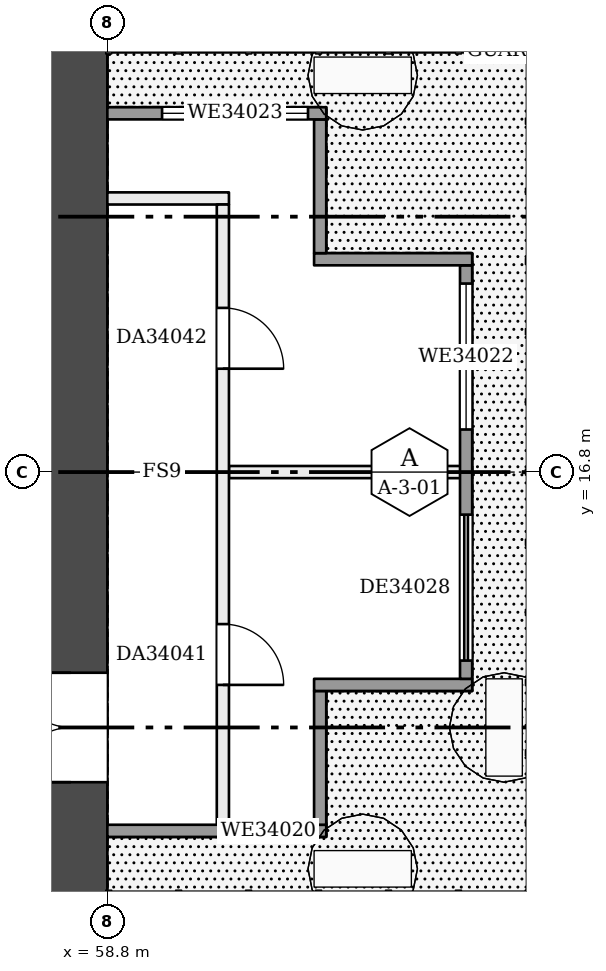
"""IFC4 building model, lengths in metres.
Left out: names, types, materials, properties, quantities, classifications, styles, units other than length and angle.
Written with IfcOpenShell. Run it as: python <this file> out.ifc"""

import sys

from ifc_helpers import new_model, si_unit, direction, frame, frame_2d, origin, place, context, subcontext, project, spatial, rectangle, extrude, element, fill, save


model = new_model("IFC4")
c1 = context("Model", 3, precision=1e-05, world=origin(), true_north=direction((0.0, 1.0)))
c2 = subcontext(c1, "Body", "Model", "MODEL_VIEW")
j1 = project(units=[si_unit("LENGTHUNIT", "METRE"), si_unit("PLANEANGLEUNIT", "RADIAN")], contexts=[c1])
p1 = place(None, origin())
s1 = spatial("IfcSite", under=j1, at=p1, CompositionType="ELEMENT")
p2 = place(p1, origin())
s2 = spatial("IfcBuilding", under=s1, at=p2, CompositionType="ELEMENT")
p3 = place(p2, frame((0.0, 0.0, 133.7)))
s3 = spatial("IfcBuildingStorey", under=s2, at=p3, CompositionType="ELEMENT", Elevation=133.7)
p4 = place(p3, frame((58.2, 9.6, 0.0), z_axis=(0.0, 0.0, 1.0), x_axis=(0.0, 1.0, 0.0)))
e1 = element("IfcWall", 1, at=p4, inside=s3, PredefinedType="SHEAR", context=c2, shape_type="SweptSolid", body=[
    extrude(rectangle(XDim=14.4, YDim=1.2, at=frame_2d((7.2, 0.0))), origin(), (0.0, 0.0, 1.0), 3.22),
])
p5 = place(p4, frame((2.1, 0.0, 0.0)))
e2 = element("IfcOpeningElement", 2, at=p5, cuts=e1, PredefinedType="OPENING", context=c2, shape_type="SweptSolid", body=[
    extrude(rectangle(XDim=1.8, YDim=2.1, at=frame_2d((0.9, 1.05))), frame((0.0, 0.61, 0.0), z_axis=(0.0, -1.0, 0.0), x_axis=(1.0, 0.0, 0.0)), (0.0, 0.0, 1.0), 1.22),
])
p6 = place(p3, frame((60.8, 16.8, 0.0), z_axis=(0.0, 0.0, 1.0), x_axis=(1.0, 0.0, 0.0)))
e3 = element("IfcWall", 3, at=p6, inside=s3, PredefinedType="PARTITIONING", context=c2, shape_type="SweptSolid", body=[
    extrude(rectangle(XDim=3.9, YDim=0.2, at=frame_2d((1.95, 0.0))), origin(), (0.0, 0.0, 1.0), 3.22),
])
p7 = place(p3, frame((58.8, 21.3, 0.0), z_axis=(0.0, 0.0, 1.0), x_axis=(1.0, 0.0, 0.0)))
e4 = element("IfcWall", 4, at=p7, inside=s3, PredefinedType="PARTITIONING", context=c2, shape_type="SweptSolid", body=[
    extrude(rectangle(XDim=2.0, YDim=0.2, at=frame_2d((1.0, 0.0))), origin(), (0.0, 0.0, 1.0), 3.22),
])
p8 = place(p3, frame((60.7, 10.9, 0.0), z_axis=(0.0, 0.0, 1.0), x_axis=(0.0, 1.0, 0.0)))
e5 = element("IfcWall", 5, at=p8, inside=s3, PredefinedType="PARTITIONING", context=c2, shape_type="SweptSolid", body=[
    extrude(rectangle(XDim=10.3, YDim=0.2, at=frame_2d((5.15, 0.0))), origin(), (0.0, 0.0, 1.0), 3.22),
])
p9 = place(p8, frame((2.4, 0.0, 0.0)))
e6 = element("IfcOpeningElement", 6, at=p9, cuts=e5, PredefinedType="OPENING", context=c2, shape_type="SweptSolid", body=[
    extrude(rectangle(XDim=1.0, YDim=2.1, at=frame_2d((0.5, 1.05))), frame((0.0, 0.11, 0.0), z_axis=(0.0, -1.0, 0.0), x_axis=(1.0, 0.0, 0.0)), (0.0, 0.0, 1.0), 0.22),
])
p10 = place(p8, frame((7.6, 0.0, 0.0)))
e7 = element("IfcOpeningElement", 7, at=p10, cuts=e5, PredefinedType="OPENING", context=c2, shape_type="SweptSolid", body=[
    extrude(rectangle(XDim=1.0, YDim=2.1, at=frame_2d((0.5, 1.05))), frame((0.0, 0.11, 0.0), z_axis=(0.0, -1.0, 0.0), x_axis=(1.0, 0.0, 0.0)), (0.0, 0.0, 1.0), 0.22),
])
p11 = place(p3, frame((58.8, 10.9, 0.0), z_axis=(0.0, 0.0, 1.0), x_axis=(1.0, 0.0, 0.0)))
e8 = element("IfcWall", 8, at=p11, inside=s3, PredefinedType="SOLIDWALL", context=c2, shape_type="SweptSolid", body=[
    extrude(rectangle(XDim=3.6, YDim=0.2, at=frame_2d((1.8, 0.0))), origin(), (0.0, 0.0, 1.0), 3.22),
])
p12 = place(p11, frame((2.0, 0.0, 0.9)))
e9 = element("IfcOpeningElement", 9, at=p12, cuts=e8, PredefinedType="OPENING", context=c2, shape_type="SweptSolid", body=[
    extrude(rectangle(XDim=1.3, YDim=1.5, at=frame_2d((0.65, 0.75))), frame((0.0, 0.11, 0.0), z_axis=(0.0, -1.0, 0.0), x_axis=(1.0, 0.0, 0.0)), (0.0, 0.0, 1.0), 0.22),
])
p13 = place(p3, frame((62.3, 11.0, 0.0), z_axis=(0.0, 0.0, 1.0), x_axis=(0.0, 1.0, 0.0)))
e10 = element("IfcWall", 10, at=p13, inside=s3, PredefinedType="SOLIDWALL", context=c2, shape_type="SweptSolid", body=[
    extrude(rectangle(XDim=2.2, YDim=0.2, at=frame_2d((1.1, 0.0))), origin(), (0.0, 0.0, 1.0), 3.22),
])
p14 = place(p3, frame((62.2, 13.3, 0.0), z_axis=(0.0, 0.0, 1.0), x_axis=(1.0, 0.0, 0.0)))
e11 = element("IfcWall", 11, at=p14, inside=s3, PredefinedType="SOLIDWALL", context=c2, shape_type="SweptSolid", body=[
    extrude(rectangle(XDim=2.6, YDim=0.2, at=frame_2d((1.3, 0.0))), origin(), (0.0, 0.0, 1.0), 3.22),
])
p15 = place(p3, frame((64.7, 13.4, 0.0), z_axis=(0.0, 0.0, 1.0), x_axis=(0.0, 1.0, 0.0)))
e12 = element("IfcWall", 12, at=p15, inside=s3, PredefinedType="SOLIDWALL", context=c2, shape_type="SweptSolid", body=[
    extrude(rectangle(XDim=6.8, YDim=0.2, at=frame_2d((3.4, 0.0))), origin(), (0.0, 0.0, 1.0), 3.22),
])
p16 = place(p15, frame((4.1, 0.0, 0.9)))
e13 = element("IfcOpeningElement", 13, at=p16, cuts=e12, PredefinedType="OPENING", context=c2, shape_type="SweptSolid", body=[
    extrude(rectangle(XDim=2.4, YDim=1.5, at=frame_2d((1.2, 0.75))), frame((0.0, 0.11, 0.0), z_axis=(0.0, -1.0, 0.0), x_axis=(1.0, 0.0, 0.0)), (0.0, 0.0, 1.0), 0.22),
])
p17 = place(p15, frame((0.3, 0.0, 0.0)))
e14 = element("IfcOpeningElement", 14, at=p17, cuts=e12, PredefinedType="OPENING", context=c2, shape_type="SweptSolid", body=[
    extrude(rectangle(XDim=2.4, YDim=2.2, at=frame_2d((1.2, 1.1))), frame((0.0, 0.11, 0.0), z_axis=(0.0, -1.0, 0.0), x_axis=(1.0, 0.0, 0.0)), (0.0, 0.0, 1.0), 0.22),
])
p18 = place(p3, frame((64.8, 20.3, 0.0), z_axis=(0.0, 0.0, 1.0), x_axis=(-1.0, 0.0, 0.0)))
e15 = element("IfcWall", 15, at=p18, inside=s3, PredefinedType="SOLIDWALL", context=c2, shape_type="SweptSolid", body=[
    extrude(rectangle(XDim=2.6, YDim=0.2, at=frame_2d((1.3, 0.0))), origin(), (0.0, 0.0, 1.0), 3.22),
])
p19 = place(p3, frame((62.3, 20.4, 0.0), z_axis=(0.0, 0.0, 1.0), x_axis=(0.0, 1.0, 0.0)))
e16 = element("IfcWall", 16, at=p19, inside=s3, PredefinedType="SOLIDWALL", context=c2, shape_type="SweptSolid", body=[
    extrude(rectangle(XDim=2.2, YDim=0.2, at=frame_2d((1.1, 0.0))), origin(), (0.0, 0.0, 1.0), 3.22),
])
p20 = place(p3, frame((62.4, 22.7, 0.0), z_axis=(0.0, 0.0, 1.0), x_axis=(-1.0, 0.0, 0.0)))
e17 = element("IfcWall", 17, at=p20, inside=s3, PredefinedType="SOLIDWALL", context=c2, shape_type="SweptSolid", body=[
    extrude(rectangle(XDim=3.6, YDim=0.2, at=frame_2d((1.8, 0.0))), origin(), (0.0, 0.0, 1.0), 3.22),
])
p21 = place(p20, frame((0.3, 0.0, 0.9)))
e18 = element("IfcOpeningElement", 18, at=p21, cuts=e17, PredefinedType="OPENING", context=c2, shape_type="SweptSolid", body=[
    extrude(rectangle(XDim=2.4, YDim=1.5, at=frame_2d((1.2, 0.75))), frame((0.0, 0.11, 0.0), z_axis=(0.0, -1.0, 0.0), x_axis=(1.0, 0.0, 0.0)), (0.0, 0.0, 1.0), 0.22),
])
p22 = place(p5, origin())
e19 = element("IfcDoor", 19, at=p22, inside=s3, OperationType="DOUBLE_DOOR_SINGLE_SWING", PredefinedType="DOOR", context=c2, shape_type="SweptSolid", body=[
    extrude(rectangle(XDim=1.8, YDim=2.1, at=frame_2d((0.9, 1.05))), frame((0.0, 0.025, 0.0), z_axis=(0.0, -1.0, 0.0), x_axis=(1.0, 0.0, 0.0)), (0.0, 0.0, 1.0), 0.05),
])
fill(e2, e19)
p23 = place(p9, frame((1.0, 0.0, 0.0), z_axis=(0.0, 0.0, 1.0), x_axis=(-1.0, 0.0, 0.0)))
e20 = element("IfcDoor", 20, at=p23, inside=s3, OperationType="SINGLE_SWING_RIGHT", PredefinedType="DOOR", context=c2, shape_type="SweptSolid", body=[
    extrude(rectangle(XDim=1.0, YDim=2.1, at=frame_2d((0.5, 1.05))), frame((0.0, 0.025, 0.0), z_axis=(0.0, -1.0, 0.0), x_axis=(1.0, 0.0, 0.0)), (0.0, 0.0, 1.0), 0.05),
])
fill(e6, e20)
p24 = place(p10, frame((1.0, 0.0, 0.0), z_axis=(0.0, 0.0, 1.0), x_axis=(-1.0, 0.0, 0.0)))
e21 = element("IfcDoor", 21, at=p24, inside=s3, OperationType="SINGLE_SWING_RIGHT", PredefinedType="DOOR", context=c2, shape_type="SweptSolid", body=[
    extrude(rectangle(XDim=1.0, YDim=2.1, at=frame_2d((0.5, 1.05))), frame((0.0, 0.025, 0.0), z_axis=(0.0, -1.0, 0.0), x_axis=(1.0, 0.0, 0.0)), (0.0, 0.0, 1.0), 0.05),
])
fill(e7, e21)
p25 = place(p12, origin())
e22 = element("IfcWindow", 22, at=p25, inside=s3, PartitioningType="SINGLE_PANEL", PredefinedType="WINDOW", context=c2, shape_type="SweptSolid", body=[
    extrude(rectangle(XDim=1.3, YDim=1.5, at=frame_2d((0.65, 0.75))), frame((0.0, 0.03, 0.0), z_axis=(0.0, -1.0, 0.0), x_axis=(1.0, 0.0, 0.0)), (0.0, 0.0, 1.0), 0.06),
])
fill(e9, e22)
p26 = place(p16, origin())
e23 = element("IfcWindow", 23, at=p26, inside=s3, PartitioningType="SINGLE_PANEL", PredefinedType="WINDOW", context=c2, shape_type="SweptSolid", body=[
    extrude(rectangle(XDim=2.4, YDim=1.5, at=frame_2d((1.2, 0.75))), frame((0.0, 0.03, 0.0), z_axis=(0.0, -1.0, 0.0), x_axis=(1.0, 0.0, 0.0)), (0.0, 0.0, 1.0), 0.06),
])
fill(e13, e23)
p27 = place(p21, origin())
e24 = element("IfcWindow", 24, at=p27, inside=s3, PartitioningType="SINGLE_PANEL", PredefinedType="WINDOW", context=c2, shape_type="SweptSolid", body=[
    extrude(rectangle(XDim=2.4, YDim=1.5, at=frame_2d((1.2, 0.75))), frame((0.0, 0.03, 0.0), z_axis=(0.0, -1.0, 0.0), x_axis=(1.0, 0.0, 0.0)), (0.0, 0.0, 1.0), 0.06),
])
fill(e18, e24)
p28 = place(p17, origin())
e25 = element("IfcDoor", 25, at=p28, inside=s3, OperationType="DOUBLE_DOOR_SLIDING", PredefinedType="DOOR", context=c2, shape_type="SweptSolid", body=[
    extrude(rectangle(XDim=2.4, YDim=2.2, at=frame_2d((1.2, 1.1))), frame((0.0, 0.025, 0.0), z_axis=(0.0, -1.0, 0.0), x_axis=(1.0, 0.0, 0.0)), (0.0, 0.0, 1.0), 0.05),
])
fill(e14, e25)
save(model, sys.argv[1])
